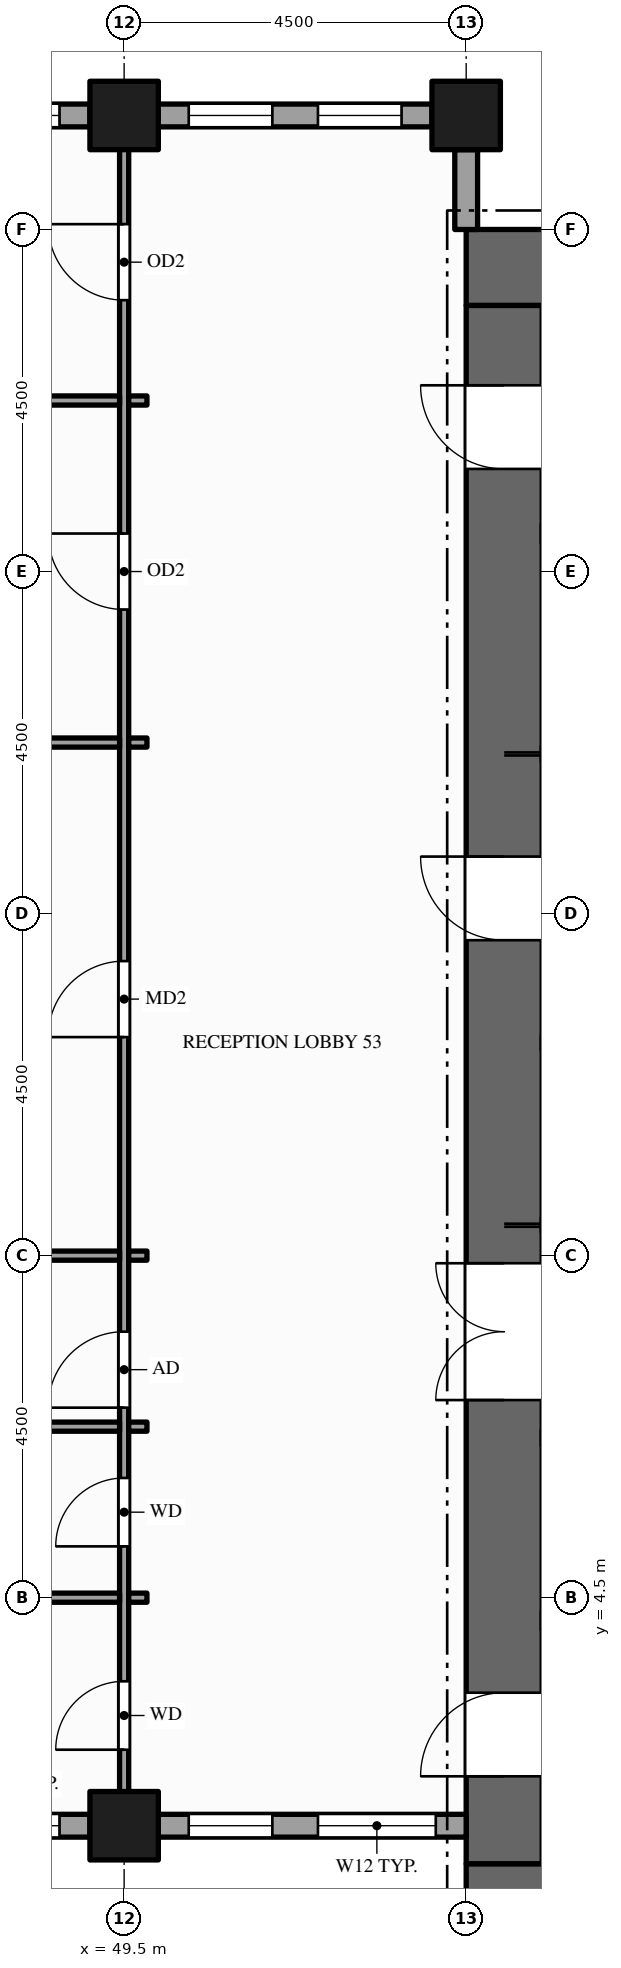
"""IFC4 building model, lengths in metres.
Left out: names, types, materials, properties, quantities, classifications, styles, units other than length and angle.
Written with IfcOpenShell. Run it as: python <this file> out.ifc"""

import sys

from ifc_helpers import new_model, si_unit, direction, frame, frame_2d, origin, origin_2d, place, context, subcontext, project, spatial, rectangle, hollow_rectangle, extrude, element, fill, save


model = new_model("IFC4")
c1 = context("Model", 3, precision=1e-05, world=origin(), true_north=direction((0.0, 1.0)))
c2 = subcontext(c1, "Body", "Model", "MODEL_VIEW")
j1 = project(units=[si_unit("LENGTHUNIT", "METRE"), si_unit("PLANEANGLEUNIT", "RADIAN")], contexts=[c1])
p1 = place(None, origin())
s1 = spatial("IfcSite", under=j1, at=p1, CompositionType="ELEMENT")
p2 = place(p1, origin())
s2 = spatial("IfcBuilding", under=s1, at=p2, CompositionType="ELEMENT")
p3 = place(p2, frame((0.0, 0.0, 147.0)))
s3 = spatial("IfcBuildingStorey", under=s2, at=p3, CompositionType="ELEMENT", Elevation=147.0)
for number, where, z_axis, x_axis in (
    (1, (67.5, 0.5, -0.15), (0.0, 0.0, 1.0), (-1.0, 0.0, 0.0)),
    (2, (54.0, 22.0, -0.15), (0.0, 0.0, 1.0), (1.0, 0.0, 0.0)),
):
    element("IfcWall", number, at=place(p3, frame(where, z_axis=z_axis, x_axis=x_axis)), inside=s3, PredefinedType="SHEAR", context=c2, shape_type="SweptSolid", body=[
        extrude(rectangle(XDim=13.5, YDim=1.0, at=frame_2d((6.75, 0.0))), origin(), (0.0, 0.0, 1.0), 4.0),
    ])
p4 = place(p3, frame((54.5, 1.0, -0.15), z_axis=(0.0, 0.0, 1.0), x_axis=(0.0, 1.0, 0.0)))
e3 = element("IfcWall", 3, at=p4, inside=s3, PredefinedType="SHEAR", context=c2, shape_type="SweptSolid", body=[
    extrude(rectangle(XDim=20.5, YDim=1.0, at=frame_2d((10.25, 0.0))), origin(), (0.0, 0.0, 1.0), 4.0),
])
p5 = place(p4, frame((6.1, 0.0, 0.15)))
e4 = element("IfcOpeningElement", 4, at=p5, cuts=e3, PredefinedType="OPENING", context=c2, shape_type="SweptSolid", body=[
    extrude(rectangle(XDim=1.8, YDim=2.1, at=frame_2d((0.9, 1.05))), frame((0.0, 0.51, 0.0), z_axis=(0.0, -1.0, 0.0), x_axis=(1.0, 0.0, 0.0)), (0.0, 0.0, 1.0), 1.02),
])
p6 = place(p4, frame((12.15, 0.0, 0.15)))
e5 = element("IfcOpeningElement", 5, at=p6, cuts=e3, PredefinedType="OPENING", context=c2, shape_type="SweptSolid", body=[
    extrude(rectangle(XDim=1.1, YDim=2.1, at=frame_2d((0.55, 1.05))), frame((0.0, 0.51, 0.0), z_axis=(0.0, -1.0, 0.0), x_axis=(1.0, 0.0, 0.0)), (0.0, 0.0, 1.0), 1.02),
])
p7 = place(p4, frame((1.15, 0.0, 0.15)))
e6 = element("IfcOpeningElement", 6, at=p7, cuts=e3, PredefinedType="OPENING", context=c2, shape_type="SweptSolid", body=[
    extrude(rectangle(XDim=1.1, YDim=2.1, at=frame_2d((0.55, 1.05))), frame((0.0, 0.51, 0.0), z_axis=(0.0, -1.0, 0.0), x_axis=(1.0, 0.0, 0.0)), (0.0, 0.0, 1.0), 1.02),
])
p8 = place(p4, frame((18.35, 0.0, 0.15)))
e7 = element("IfcOpeningElement", 7, at=p8, cuts=e3, PredefinedType="OPENING", context=c2, shape_type="SweptSolid", body=[
    extrude(rectangle(XDim=1.1, YDim=2.1, at=frame_2d((0.55, 1.05))), frame((0.0, 0.51, 0.0), z_axis=(0.0, -1.0, 0.0), x_axis=(1.0, 0.0, 0.0)), (0.0, 0.0, 1.0), 1.02),
])
for number, where, z_axis, x_axis in (
    (8, (49.5, 1.5, -0.15), (0.0, 0.0, 1.0), (1.0, 0.0, 0.0)),
    (9, (49.5, 24.0, -0.15), (0.0, 0.0, 1.0), (1.0, 0.0, 0.0)),
    (10, (54.0, 24.0, -0.15), (0.0, 0.0, 1.0), (1.0, 0.0, 0.0)),
):
    element("IfcColumn", number, at=place(p3, frame(where, z_axis=z_axis, x_axis=x_axis)), inside=s3, PredefinedType="COLUMN", context=c2, shape_type="SweptSolid", body=[
        extrude(hollow_rectangle(XDim=0.9, YDim=0.9, WallThickness=0.045, at=origin_2d()), origin(), (0.0, 0.0, 1.0), 4.0),
    ])
p9 = place(p3, frame((45.45, 1.5, 0.0), z_axis=(0.0, 0.0, 1.0), x_axis=(1.0, 0.0, 0.0)))
e11 = element("IfcWall", 11, at=p9, inside=s3, PredefinedType="STANDARD", context=c2, shape_type="SweptSolid", body=[
    extrude(rectangle(XDim=3.6, YDim=0.3, at=frame_2d((1.8, 0.0))), origin(), (0.0, 0.0, 1.0), 2.87),
])
p10 = place(p9, frame((0.4, 0.0, 0.9)))
e12 = element("IfcOpeningElement", 12, at=p10, cuts=e11, PredefinedType="OPENING", context=c2, shape_type="SweptSolid", body=[
    extrude(rectangle(XDim=1.1, YDim=1.75, at=frame_2d((0.55, 0.875))), frame((0.0, 0.16, 0.0), z_axis=(0.0, -1.0, 0.0), x_axis=(1.0, 0.0, 0.0)), (0.0, 0.0, 1.0), 0.32),
])
p11 = place(p9, frame((2.1, 0.0, 0.9)))
e13 = element("IfcOpeningElement", 13, at=p11, cuts=e11, PredefinedType="OPENING", context=c2, shape_type="SweptSolid", body=[
    extrude(rectangle(XDim=1.1, YDim=1.75, at=frame_2d((0.55, 0.875))), frame((0.0, 0.16, 0.0), z_axis=(0.0, -1.0, 0.0), x_axis=(1.0, 0.0, 0.0)), (0.0, 0.0, 1.0), 0.32),
])
p12 = place(p3, frame((49.95, 1.5, 0.0), z_axis=(0.0, 0.0, 1.0), x_axis=(1.0, 0.0, 0.0)))
e14 = element("IfcWall", 14, at=p12, inside=s3, PredefinedType="STANDARD", context=c2, shape_type="SweptSolid", body=[
    extrude(rectangle(XDim=4.05, YDim=0.3, at=frame_2d((2.025, 0.0))), origin(), (0.0, 0.0, 1.0), 2.87),
])
p13 = place(p12, frame((0.4, 0.0, 0.9)))
e15 = element("IfcOpeningElement", 15, at=p13, cuts=e14, PredefinedType="OPENING", context=c2, shape_type="SweptSolid", body=[
    extrude(rectangle(XDim=1.1, YDim=1.75, at=frame_2d((0.55, 0.875))), frame((0.0, 0.16, 0.0), z_axis=(0.0, -1.0, 0.0), x_axis=(1.0, 0.0, 0.0)), (0.0, 0.0, 1.0), 0.32),
])
p14 = place(p12, frame((2.1, 0.0, 0.9)))
e16 = element("IfcOpeningElement", 16, at=p14, cuts=e14, PredefinedType="OPENING", context=c2, shape_type="SweptSolid", body=[
    extrude(rectangle(XDim=1.55, YDim=1.75, at=frame_2d((0.775, 0.875))), frame((0.0, 0.16, 0.0), z_axis=(0.0, -1.0, 0.0), x_axis=(1.0, 0.0, 0.0)), (0.0, 0.0, 1.0), 0.32),
])
p15 = place(p3, frame((54.0, 22.5, 0.0), z_axis=(0.0, 0.0, 1.0), x_axis=(0.0, 1.0, 0.0)))
e17 = element("IfcWall", 17, at=p15, inside=s3, PredefinedType="STANDARD", context=c2, shape_type="SweptSolid", body=[
    extrude(rectangle(XDim=1.05, YDim=0.3, at=frame_2d((0.525, 0.0))), origin(), (0.0, 0.0, 1.0), 3.149),
])
p16 = place(p3, frame((53.55, 24.0, 0.0), z_axis=(0.0, 0.0, 1.0), x_axis=(-1.0, 0.0, 0.0)))
e18 = element("IfcWall", 18, at=p16, inside=s3, PredefinedType="STANDARD", context=c2, shape_type="SweptSolid", body=[
    extrude(rectangle(XDim=3.6, YDim=0.3, at=frame_2d((1.8, 0.0))), origin(), (0.0, 0.0, 1.0), 2.87),
])
p17 = place(p16, frame((0.4, 0.0, 0.9)))
e19 = element("IfcOpeningElement", 19, at=p17, cuts=e18, PredefinedType="OPENING", context=c2, shape_type="SweptSolid", body=[
    extrude(rectangle(XDim=1.1, YDim=1.75, at=frame_2d((0.55, 0.875))), frame((0.0, 0.16, 0.0), z_axis=(0.0, -1.0, 0.0), x_axis=(1.0, 0.0, 0.0)), (0.0, 0.0, 1.0), 0.32),
])
p18 = place(p16, frame((2.1, 0.0, 0.9)))
e20 = element("IfcOpeningElement", 20, at=p18, cuts=e18, PredefinedType="OPENING", context=c2, shape_type="SweptSolid", body=[
    extrude(rectangle(XDim=1.1, YDim=1.75, at=frame_2d((0.55, 0.875))), frame((0.0, 0.16, 0.0), z_axis=(0.0, -1.0, 0.0), x_axis=(1.0, 0.0, 0.0)), (0.0, 0.0, 1.0), 0.32),
])
p19 = place(p3, frame((49.05, 24.0, 0.0), z_axis=(0.0, 0.0, 1.0), x_axis=(-1.0, 0.0, 0.0)))
e21 = element("IfcWall", 21, at=p19, inside=s3, PredefinedType="STANDARD", context=c2, shape_type="SweptSolid", body=[
    extrude(rectangle(XDim=3.6, YDim=0.3, at=frame_2d((1.8, 0.0))), origin(), (0.0, 0.0, 1.0), 2.87),
])
p20 = place(p19, frame((0.4, 0.0, 0.9)))
e22 = element("IfcOpeningElement", 22, at=p20, cuts=e21, PredefinedType="OPENING", context=c2, shape_type="SweptSolid", body=[
    extrude(rectangle(XDim=1.1, YDim=1.75, at=frame_2d((0.55, 0.875))), frame((0.0, 0.16, 0.0), z_axis=(0.0, -1.0, 0.0), x_axis=(1.0, 0.0, 0.0)), (0.0, 0.0, 1.0), 0.32),
])
p21 = place(p19, frame((2.1, 0.0, 0.9)))
e23 = element("IfcOpeningElement", 23, at=p21, cuts=e21, PredefinedType="OPENING", context=c2, shape_type="SweptSolid", body=[
    extrude(rectangle(XDim=1.1, YDim=1.75, at=frame_2d((0.55, 0.875))), frame((0.0, 0.16, 0.0), z_axis=(0.0, -1.0, 0.0), x_axis=(1.0, 0.0, 0.0)), (0.0, 0.0, 1.0), 0.32),
])
p22 = place(p3, frame((49.5, 1.65, 0.0), z_axis=(0.0, 0.0, 1.0), x_axis=(0.0, 1.0, 0.0)))
e24 = element("IfcWall", 24, at=p22, inside=s3, PredefinedType="PARTITIONING", context=c2, shape_type="SweptSolid", body=[
    extrude(rectangle(XDim=22.2, YDim=0.12, at=frame_2d((11.1, 0.0))), origin(), (0.0, 0.0, 1.0), 2.87),
])
p23 = place(p22, frame((0.85, 0.0, 0.0)))
e25 = element("IfcOpeningElement", 25, at=p23, cuts=e24, PredefinedType="OPENING", context=c2, shape_type="SweptSolid", body=[
    extrude(rectangle(XDim=0.9, YDim=2.1, at=frame_2d((0.45, 1.05))), frame((0.0, 0.07, 0.0), z_axis=(0.0, -1.0, 0.0), x_axis=(1.0, 0.0, 0.0)), (0.0, 0.0, 1.0), 0.14),
])
p24 = place(p22, frame((3.525, 0.0, 0.0)))
e26 = element("IfcOpeningElement", 26, at=p24, cuts=e24, PredefinedType="OPENING", context=c2, shape_type="SweptSolid", body=[
    extrude(rectangle(XDim=0.9, YDim=2.1, at=frame_2d((0.45, 1.05))), frame((0.0, 0.07, 0.0), z_axis=(0.0, -1.0, 0.0), x_axis=(1.0, 0.0, 0.0)), (0.0, 0.0, 1.0), 0.14),
])
p25 = place(p22, frame((5.35, 0.0, 0.0)))
e27 = element("IfcOpeningElement", 27, at=p25, cuts=e24, PredefinedType="OPENING", context=c2, shape_type="SweptSolid", body=[
    extrude(rectangle(XDim=1.0, YDim=2.1, at=frame_2d((0.5, 1.05))), frame((0.0, 0.07, 0.0), z_axis=(0.0, -1.0, 0.0), x_axis=(1.0, 0.0, 0.0)), (0.0, 0.0, 1.0), 0.14),
])
p26 = place(p22, frame((10.225, 0.0, 0.0)))
e28 = element("IfcOpeningElement", 28, at=p26, cuts=e24, PredefinedType="OPENING", context=c2, shape_type="SweptSolid", body=[
    extrude(rectangle(XDim=1.0, YDim=2.1, at=frame_2d((0.5, 1.05))), frame((0.0, 0.07, 0.0), z_axis=(0.0, -1.0, 0.0), x_axis=(1.0, 0.0, 0.0)), (0.0, 0.0, 1.0), 0.14),
])
p27 = place(p22, frame((15.85, 0.0, 0.0)))
e29 = element("IfcOpeningElement", 29, at=p27, cuts=e24, PredefinedType="OPENING", context=c2, shape_type="SweptSolid", body=[
    extrude(rectangle(XDim=1.0, YDim=2.1, at=frame_2d((0.5, 1.05))), frame((0.0, 0.07, 0.0), z_axis=(0.0, -1.0, 0.0), x_axis=(1.0, 0.0, 0.0)), (0.0, 0.0, 1.0), 0.14),
])
p28 = place(p22, frame((19.92, 0.0, 0.0)))
e30 = element("IfcOpeningElement", 30, at=p28, cuts=e24, PredefinedType="OPENING", context=c2, shape_type="SweptSolid", body=[
    extrude(rectangle(XDim=1.0, YDim=2.1, at=frame_2d((0.5, 1.05))), frame((0.0, 0.07, 0.0), z_axis=(0.0, -1.0, 0.0), x_axis=(1.0, 0.0, 0.0)), (0.0, 0.0, 1.0), 0.14),
])
p29 = place(p3, frame((45.15, 4.5, 0.0), z_axis=(0.0, 0.0, 1.0), x_axis=(1.0, 0.0, 0.0)))
e31 = element("IfcWall", 31, at=p29, inside=s3, PredefinedType="PARTITIONING", context=c2, shape_type="SweptSolid", body=[
    extrude(rectangle(XDim=4.29, YDim=0.12, at=frame_2d((2.145, 0.0))), origin(), (0.0, 0.0, 1.0), 2.87),
])
p30 = place(p3, frame((49.56, 4.5, 0.0), z_axis=(0.0, 0.0, 1.0), x_axis=(1.0, 0.0, 0.0)))
e32 = element("IfcWall", 32, at=p30, inside=s3, PredefinedType="PARTITIONING", context=c2, shape_type="SweptSolid", body=[
    extrude(rectangle(XDim=0.24, YDim=0.12, at=frame_2d((0.12, 0.0))), origin(), (0.0, 0.0, 1.0), 2.87),
])
p31 = place(p3, frame((45.15, 6.75, 0.0), z_axis=(0.0, 0.0, 1.0), x_axis=(1.0, 0.0, 0.0)))
e33 = element("IfcWall", 33, at=p31, inside=s3, PredefinedType="PARTITIONING", context=c2, shape_type="SweptSolid", body=[
    extrude(rectangle(XDim=4.29, YDim=0.12, at=frame_2d((2.145, 0.0))), origin(), (0.0, 0.0, 1.0), 2.87),
])
p32 = place(p3, frame((49.56, 6.75, 0.0), z_axis=(0.0, 0.0, 1.0), x_axis=(1.0, 0.0, 0.0)))
e34 = element("IfcWall", 34, at=p32, inside=s3, PredefinedType="PARTITIONING", context=c2, shape_type="SweptSolid", body=[
    extrude(rectangle(XDim=0.24, YDim=0.12, at=frame_2d((0.12, 0.0))), origin(), (0.0, 0.0, 1.0), 2.87),
])
p33 = place(p3, frame((45.15, 9.0, 0.0), z_axis=(0.0, 0.0, 1.0), x_axis=(1.0, 0.0, 0.0)))
e35 = element("IfcWall", 35, at=p33, inside=s3, PredefinedType="PARTITIONING", context=c2, shape_type="SweptSolid", body=[
    extrude(rectangle(XDim=4.29, YDim=0.12, at=frame_2d((2.145, 0.0))), origin(), (0.0, 0.0, 1.0), 2.87),
])
p34 = place(p3, frame((49.56, 9.0, 0.0), z_axis=(0.0, 0.0, 1.0), x_axis=(1.0, 0.0, 0.0)))
e36 = element("IfcWall", 36, at=p34, inside=s3, PredefinedType="PARTITIONING", context=c2, shape_type="SweptSolid", body=[
    extrude(rectangle(XDim=0.24, YDim=0.12, at=frame_2d((0.12, 0.0))), origin(), (0.0, 0.0, 1.0), 2.87),
])
p35 = place(p3, frame((55.0, 9.4, 0.0), z_axis=(0.0, 0.0, 1.0), x_axis=(1.0, 0.0, 0.0)))
e37 = element("IfcWall", 37, at=p35, inside=s3, PredefinedType="SOLIDWALL", context=c2, shape_type="SweptSolid", body=[
    extrude(rectangle(XDim=2.3, YDim=0.2, at=frame_2d((1.15, 0.0))), origin(), (0.0, 0.0, 1.0), 3.85),
])
p36 = place(p35, frame((0.6, 0.0, 0.012)))
e38 = element("IfcOpeningElement", 38, at=p36, cuts=e37, PredefinedType="OPENING", context=c2, shape_type="SweptSolid", body=[
    extrude(rectangle(XDim=1.1, YDim=2.1, at=frame_2d((0.55, 1.05))), frame((0.0, 0.11, 0.0), z_axis=(0.0, -1.0, 0.0), x_axis=(1.0, 0.0, 0.0)), (0.0, 0.0, 1.0), 0.22),
])
p37 = place(p3, frame((55.0, 11.8, 0.0), z_axis=(0.0, 0.0, 1.0), x_axis=(1.0, 0.0, 0.0)))
e39 = element("IfcWall", 39, at=p37, inside=s3, PredefinedType="SOLIDWALL", context=c2, shape_type="SweptSolid", body=[
    extrude(rectangle(XDim=2.3, YDim=0.2, at=frame_2d((1.15, 0.0))), origin(), (0.0, 0.0, 1.0), 3.85),
])
p38 = place(p3, frame((55.0, 15.6, 0.0), z_axis=(0.0, 0.0, 1.0), x_axis=(1.0, 0.0, 0.0)))
e40 = element("IfcWall", 40, at=p38, inside=s3, PredefinedType="SOLIDWALL", context=c2, shape_type="SweptSolid", body=[
    extrude(rectangle(XDim=2.3, YDim=0.2, at=frame_2d((1.15, 0.0))), origin(), (0.0, 0.0, 1.0), 3.85),
])
p39 = place(p38, frame((0.6, 0.0, 0.012)))
e41 = element("IfcOpeningElement", 41, at=p39, cuts=e40, PredefinedType="OPENING", context=c2, shape_type="SweptSolid", body=[
    extrude(rectangle(XDim=1.1, YDim=2.1, at=frame_2d((0.55, 1.05))), frame((0.0, 0.11, 0.0), z_axis=(0.0, -1.0, 0.0), x_axis=(1.0, 0.0, 0.0)), (0.0, 0.0, 1.0), 0.22),
])
p40 = place(p3, frame((45.15, 15.75, 0.0), z_axis=(0.0, 0.0, 1.0), x_axis=(1.0, 0.0, 0.0)))
e42 = element("IfcWall", 42, at=p40, inside=s3, PredefinedType="PARTITIONING", context=c2, shape_type="SweptSolid", body=[
    extrude(rectangle(XDim=4.29, YDim=0.12, at=frame_2d((2.145, 0.0))), origin(), (0.0, 0.0, 1.0), 2.87),
])
p41 = place(p3, frame((49.56, 15.75, 0.0), z_axis=(0.0, 0.0, 1.0), x_axis=(1.0, 0.0, 0.0)))
e43 = element("IfcWall", 43, at=p41, inside=s3, PredefinedType="PARTITIONING", context=c2, shape_type="SweptSolid", body=[
    extrude(rectangle(XDim=0.24, YDim=0.12, at=frame_2d((0.12, 0.0))), origin(), (0.0, 0.0, 1.0), 2.87),
])
p42 = place(p3, frame((45.15, 20.25, 0.0), z_axis=(0.0, 0.0, 1.0), x_axis=(1.0, 0.0, 0.0)))
e44 = element("IfcWall", 44, at=p42, inside=s3, PredefinedType="PARTITIONING", context=c2, shape_type="SweptSolid", body=[
    extrude(rectangle(XDim=4.29, YDim=0.12, at=frame_2d((2.145, 0.0))), origin(), (0.0, 0.0, 1.0), 2.87),
])
p43 = place(p3, frame((49.56, 20.25, 0.0), z_axis=(0.0, 0.0, 1.0), x_axis=(1.0, 0.0, 0.0)))
e45 = element("IfcWall", 45, at=p43, inside=s3, PredefinedType="PARTITIONING", context=c2, shape_type="SweptSolid", body=[
    extrude(rectangle(XDim=0.24, YDim=0.12, at=frame_2d((0.12, 0.0))), origin(), (0.0, 0.0, 1.0), 2.87),
])
p44 = place(p11, origin())
e46 = element("IfcWindow", 46, at=p44, inside=s3, PartitioningType="SINGLE_PANEL", PredefinedType="WINDOW", context=c2, shape_type="SweptSolid", body=[
    extrude(rectangle(XDim=1.1, YDim=1.75, at=frame_2d((0.55, 0.875))), frame((0.0, 0.03, 0.0), z_axis=(0.0, -1.0, 0.0), x_axis=(1.0, 0.0, 0.0)), (0.0, 0.0, 1.0), 0.06),
])
fill(e13, e46)
p45 = place(p13, origin())
e47 = element("IfcWindow", 47, at=p45, inside=s3, PartitioningType="SINGLE_PANEL", PredefinedType="WINDOW", context=c2, shape_type="SweptSolid", body=[
    extrude(rectangle(XDim=1.1, YDim=1.75, at=frame_2d((0.55, 0.875))), frame((0.0, 0.03, 0.0), z_axis=(0.0, -1.0, 0.0), x_axis=(1.0, 0.0, 0.0)), (0.0, 0.0, 1.0), 0.06),
])
fill(e15, e47)
p46 = place(p14, origin())
e48 = element("IfcWindow", 48, at=p46, inside=s3, PartitioningType="SINGLE_PANEL", PredefinedType="WINDOW", context=c2, shape_type="SweptSolid", body=[
    extrude(rectangle(XDim=1.55, YDim=1.75, at=frame_2d((0.775, 0.875))), frame((0.0, 0.03, 0.0), z_axis=(0.0, -1.0, 0.0), x_axis=(1.0, 0.0, 0.0)), (0.0, 0.0, 1.0), 0.06),
])
fill(e16, e48)
p47 = place(p17, origin())
e49 = element("IfcWindow", 49, at=p47, inside=s3, PartitioningType="SINGLE_PANEL", PredefinedType="WINDOW", context=c2, shape_type="SweptSolid", body=[
    extrude(rectangle(XDim=1.1, YDim=1.75, at=frame_2d((0.55, 0.875))), frame((0.0, 0.03, 0.0), z_axis=(0.0, -1.0, 0.0), x_axis=(1.0, 0.0, 0.0)), (0.0, 0.0, 1.0), 0.06),
])
fill(e19, e49)
p48 = place(p18, origin())
e50 = element("IfcWindow", 50, at=p48, inside=s3, PartitioningType="SINGLE_PANEL", PredefinedType="WINDOW", context=c2, shape_type="SweptSolid", body=[
    extrude(rectangle(XDim=1.1, YDim=1.75, at=frame_2d((0.55, 0.875))), frame((0.0, 0.03, 0.0), z_axis=(0.0, -1.0, 0.0), x_axis=(1.0, 0.0, 0.0)), (0.0, 0.0, 1.0), 0.06),
])
fill(e20, e50)
p49 = place(p20, origin())
e51 = element("IfcWindow", 51, at=p49, inside=s3, PartitioningType="SINGLE_PANEL", PredefinedType="WINDOW", context=c2, shape_type="SweptSolid", body=[
    extrude(rectangle(XDim=1.1, YDim=1.75, at=frame_2d((0.55, 0.875))), frame((0.0, 0.03, 0.0), z_axis=(0.0, -1.0, 0.0), x_axis=(1.0, 0.0, 0.0)), (0.0, 0.0, 1.0), 0.06),
])
fill(e22, e51)
p50 = place(p5, origin())
e52 = element("IfcDoor", 52, at=p50, inside=s3, OperationType="DOUBLE_DOOR_SINGLE_SWING", PredefinedType="DOOR", context=c2, shape_type="SweptSolid", body=[
    extrude(rectangle(XDim=1.8, YDim=2.1, at=frame_2d((0.9, 1.05))), frame((0.0, 0.025, 0.0), z_axis=(0.0, -1.0, 0.0), x_axis=(1.0, 0.0, 0.0)), (0.0, 0.0, 1.0), 0.05),
])
fill(e4, e52)
p51 = place(p6, origin())
e53 = element("IfcDoor", 53, at=p51, inside=s3, OperationType="SINGLE_SWING_RIGHT", PredefinedType="DOOR", context=c2, shape_type="SweptSolid", body=[
    extrude(rectangle(XDim=1.1, YDim=2.1, at=frame_2d((0.55, 1.05))), frame((0.0, 0.025, 0.0), z_axis=(0.0, -1.0, 0.0), x_axis=(1.0, 0.0, 0.0)), (0.0, 0.0, 1.0), 0.05),
])
fill(e5, e53)
p52 = place(p7, origin())
e54 = element("IfcDoor", 54, at=p52, inside=s3, OperationType="SINGLE_SWING_LEFT", PredefinedType="DOOR", context=c2, shape_type="SweptSolid", body=[
    extrude(rectangle(XDim=1.1, YDim=2.1, at=frame_2d((0.55, 1.05))), frame((0.0, 0.025, 0.0), z_axis=(0.0, -1.0, 0.0), x_axis=(1.0, 0.0, 0.0)), (0.0, 0.0, 1.0), 0.05),
])
fill(e6, e54)
p53 = place(p8, origin())
e55 = element("IfcDoor", 55, at=p53, inside=s3, OperationType="SINGLE_SWING_RIGHT", PredefinedType="DOOR", context=c2, shape_type="SweptSolid", body=[
    extrude(rectangle(XDim=1.1, YDim=2.1, at=frame_2d((0.55, 1.05))), frame((0.0, 0.025, 0.0), z_axis=(0.0, -1.0, 0.0), x_axis=(1.0, 0.0, 0.0)), (0.0, 0.0, 1.0), 0.05),
])
fill(e7, e55)
p54 = place(p23, origin())
e56 = element("IfcDoor", 56, at=p54, inside=s3, OperationType="SINGLE_SWING_LEFT", PredefinedType="DOOR", context=c2, shape_type="SweptSolid", body=[
    extrude(rectangle(XDim=0.9, YDim=2.1, at=frame_2d((0.45, 1.05))), frame((0.0, 0.025, 0.0), z_axis=(0.0, -1.0, 0.0), x_axis=(1.0, 0.0, 0.0)), (0.0, 0.0, 1.0), 0.05),
])
fill(e25, e56)
p55 = place(p24, origin())
e57 = element("IfcDoor", 57, at=p55, inside=s3, OperationType="SINGLE_SWING_LEFT", PredefinedType="DOOR", context=c2, shape_type="SweptSolid", body=[
    extrude(rectangle(XDim=0.9, YDim=2.1, at=frame_2d((0.45, 1.05))), frame((0.0, 0.025, 0.0), z_axis=(0.0, -1.0, 0.0), x_axis=(1.0, 0.0, 0.0)), (0.0, 0.0, 1.0), 0.05),
])
fill(e26, e57)
p56 = place(p25, origin())
e58 = element("IfcDoor", 58, at=p56, inside=s3, OperationType="SINGLE_SWING_LEFT", PredefinedType="DOOR", context=c2, shape_type="SweptSolid", body=[
    extrude(rectangle(XDim=1.0, YDim=2.1, at=frame_2d((0.5, 1.05))), frame((0.0, 0.025, 0.0), z_axis=(0.0, -1.0, 0.0), x_axis=(1.0, 0.0, 0.0)), (0.0, 0.0, 1.0), 0.05),
])
fill(e27, e58)
p57 = place(p26, origin())
e59 = element("IfcDoor", 59, at=p57, inside=s3, OperationType="SINGLE_SWING_LEFT", PredefinedType="DOOR", context=c2, shape_type="SweptSolid", body=[
    extrude(rectangle(XDim=1.0, YDim=2.1, at=frame_2d((0.5, 1.05))), frame((0.0, 0.025, 0.0), z_axis=(0.0, -1.0, 0.0), x_axis=(1.0, 0.0, 0.0)), (0.0, 0.0, 1.0), 0.05),
])
fill(e28, e59)
p58 = place(p27, origin())
e60 = element("IfcDoor", 60, at=p58, inside=s3, OperationType="SINGLE_SWING_RIGHT", PredefinedType="DOOR", context=c2, shape_type="SweptSolid", body=[
    extrude(rectangle(XDim=1.0, YDim=2.1, at=frame_2d((0.5, 1.05))), frame((0.0, 0.025, 0.0), z_axis=(0.0, -1.0, 0.0), x_axis=(1.0, 0.0, 0.0)), (0.0, 0.0, 1.0), 0.05),
])
fill(e29, e60)
p59 = place(p28, origin())
e61 = element("IfcDoor", 61, at=p59, inside=s3, OperationType="SINGLE_SWING_RIGHT", PredefinedType="DOOR", context=c2, shape_type="SweptSolid", body=[
    extrude(rectangle(XDim=1.0, YDim=2.1, at=frame_2d((0.5, 1.05))), frame((0.0, 0.025, 0.0), z_axis=(0.0, -1.0, 0.0), x_axis=(1.0, 0.0, 0.0)), (0.0, 0.0, 1.0), 0.05),
])
fill(e30, e61)
save(model, sys.argv[1])
